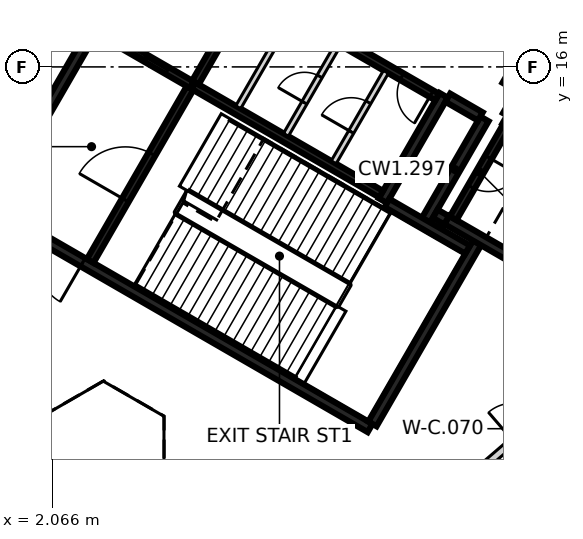
"""IFC4 building model, lengths in metres.
Left out: names, types, materials, properties, quantities, classifications, styles, units other than length and angle.
Written with IfcOpenShell. Run it as: python <this file> out.ifc"""

import sys

from ifc_helpers import new_model, si_unit, direction, frame, frame_2d, origin, place, context, subcontext, project, spatial, rectangle, extrude, element, fill, save


model = new_model("IFC4")
c1 = context("Model", 3, precision=1e-05, world=origin(), true_north=direction((0.0, 1.0)))
c2 = subcontext(c1, "Body", "Model", "MODEL_VIEW")
j1 = project(units=[si_unit("LENGTHUNIT", "METRE"), si_unit("PLANEANGLEUNIT", "RADIAN")], contexts=[c1])
p1 = place(None, origin())
s1 = spatial("IfcSite", under=j1, at=p1, CompositionType="ELEMENT")
p2 = place(p1, origin())
s2 = spatial("IfcBuilding", under=s1, at=p2, CompositionType="ELEMENT")
p3 = place(p2, frame((0.0, 0.0, 14.0)))
s3 = spatial("IfcBuildingStorey", under=s2, at=p3, CompositionType="ELEMENT", Elevation=14.0)
p4 = place(p3, frame((10.42, 6.498, 0.0), z_axis=(0.0, 0.0, 1.0), x_axis=(-0.866021906294, 0.500006057782, 0.0)))
e1 = element("IfcWall", 1, at=p4, inside=s3, PredefinedType="SHEAR", context=c2, shape_type="SweptSolid", body=[
    extrude(rectangle(XDim=11.55, YDim=0.25, at=frame_2d((5.775, 0.0))), origin(), (0.0, 0.0, 1.0), 5.15),
])
p5 = place(p4, frame((10.025, 0.0, 0.0)))
e2 = element("IfcOpeningElement", 2, at=p5, cuts=e1, PredefinedType="OPENING", context=c2, shape_type="SweptSolid", body=[
    extrude(rectangle(XDim=1.2, YDim=2.1, at=frame_2d((0.6, 1.05))), frame((0.0, 0.135, 0.0), z_axis=(0.0, -1.0, 0.0), x_axis=(1.0, 0.0, 0.0)), (0.0, 0.0, 1.0), 0.27),
])
p6 = place(p4, frame((8.725, 0.0, 0.0)))
e3 = element("IfcOpeningElement", 3, at=p6, cuts=e1, PredefinedType="OPENING", context=c2, shape_type="SweptSolid", body=[
    extrude(rectangle(XDim=1.2, YDim=2.1, at=frame_2d((0.6, 1.05))), frame((0.0, 0.135, 0.0), z_axis=(0.0, -1.0, 0.0), x_axis=(1.0, 0.0, 0.0)), (0.0, 0.0, 1.0), 0.27),
])
p7 = place(p3, frame((0.48, 12.381, 0.0), z_axis=(0.0, 0.0, 1.0), x_axis=(0.49999885962, 0.866026062182, 0.0)))
e4 = element("IfcWall", 4, at=p7, inside=s3, PredefinedType="SHEAR", context=c2, shape_type="SweptSolid", body=[
    extrude(rectangle(XDim=5.225, YDim=0.25, at=frame_2d((2.612, 0.0))), origin(), (0.0, 0.0, 1.0), 5.15),
])
p8 = place(p3, frame((13.238, 11.378, 0.0), z_axis=(0.0, 0.0, 1.0), x_axis=(-0.500008851346, -0.866020293397, 0.0)))
e5 = element("IfcWall", 5, at=p8, inside=s3, PredefinedType="SHEAR", context=c2, shape_type="SweptSolid", body=[
    extrude(rectangle(XDim=5.51, YDim=0.25, at=frame_2d((2.755, 0.0))), origin(), (0.0, 0.0, 1.0), 5.15),
])
p9 = place(p3, frame((12.357, 15.252, 0.0), z_axis=(0.0, 0.0, 1.0), x_axis=(-0.500028443584, -0.866008981251, 0.0)))
e6 = element("IfcWall", 6, at=p9, inside=s3, PredefinedType="SHEAR", context=c2, shape_type="SweptSolid", body=[
    extrude(rectangle(XDim=3.2, YDim=0.25, at=frame_2d((1.6, 0.0))), origin(), (0.0, 0.0, 1.0), 5.15),
])
p10 = place(p3, frame((14.918, 10.54, 0.0), z_axis=(0.0, 0.0, 1.0), x_axis=(-0.866063538972, 0.499933942099, 0.0)))
e7 = element("IfcWall", 7, at=p10, inside=s3, PredefinedType="SHEAR", context=c2, shape_type="SweptSolid", body=[
    extrude(rectangle(XDim=2.865, YDim=0.25, at=frame_2d((1.432, 0.0))), origin(), (0.0, 0.0, 1.0), 5.15),
])
p11 = place(p3, frame((13.963, 14.614, 0.0), z_axis=(0.0, 0.0, 1.0), x_axis=(0.866042235819, -0.499970844928, 0.0)))
e8 = element("IfcWall", 8, at=p11, inside=s3, PredefinedType="SHEAR", context=c2, shape_type="SweptSolid", body=[
    extrude(rectangle(XDim=2.865, YDim=0.25, at=frame_2d((1.432, 0.0))), origin(), (0.0, 0.0, 1.0), 5.15),
])
p12 = place(p3, frame((11.888, 11.961, 0.0), z_axis=(0.0, 0.0, 1.0), x_axis=(0.500003324108, 0.866023484601, 0.0)))
e9 = element("IfcWall", 9, at=p12, inside=s3, PredefinedType="SHEAR", context=c2, shape_type="SweptSolid", body=[
    extrude(rectangle(XDim=3.085, YDim=0.25, at=frame_2d((1.542, 0.0))), origin(), (0.0, 0.0, 1.0), 5.15),
])
p13 = place(p3, frame((10.865, 12.418, 0.0), z_axis=(0.0, 0.0, 1.0), x_axis=(0.866026229868, -0.499998569178, 0.0)))
e10 = element("IfcWall", 10, at=p13, inside=s3, PredefinedType="SHEAR", context=c2, shape_type="SweptSolid", body=[
    extrude(rectangle(XDim=2.449, YDim=0.25, at=frame_2d((1.225, 0.0))), origin(), (0.0, 0.0, 1.0), 5.15),
])
p14 = place(p3, frame((14.945, 17.135, 0.0), z_axis=(0.0, 0.0, 1.0), x_axis=(-0.499983108224, -0.866035156036, 0.0)))
e11 = element("IfcWall", 11, at=p14, inside=s3, PredefinedType="SHEAR", context=c2, shape_type="SweptSolid", body=[
    extrude(rectangle(XDim=1.865, YDim=0.25, at=frame_2d((0.932, 0.0))), origin(), (0.0, 0.0, 1.0), 5.15),
])
p15 = place(p14, frame((0.535, 0.0, 0.0)))
e12 = element("IfcOpeningElement", 12, at=p15, cuts=e11, PredefinedType="OPENING", context=c2, shape_type="SweptSolid", body=[
    extrude(rectangle(XDim=1.25, YDim=2.1, at=frame_2d((0.625, 1.05))), frame((0.0, 0.135, 0.0), z_axis=(0.0, -1.0, 0.0), x_axis=(1.0, 0.0, 0.0)), (0.0, 0.0, 1.0), 0.27),
])
p16 = place(p3, frame((13.322, 14.695, 0.0), z_axis=(0.0, 0.0, 1.0), x_axis=(-0.866017078145, 0.500014420154, 0.0)))
e13 = element("IfcWall", 13, at=p16, inside=s3, PredefinedType="SHEAR", context=c2, shape_type="SweptSolid", body=[
    extrude(rectangle(XDim=0.989, YDim=0.25, at=frame_2d((0.495, 0.0))), origin(), (0.0, 0.0, 1.0), 5.15),
])
p17 = place(p3, frame((14.368, 15.315, 0.0), z_axis=(0.0, 0.0, 1.0), x_axis=(-0.499897359611, -0.866084655132, 0.0)))
e14 = element("IfcWall", 14, at=p17, inside=s3, PredefinedType="SHEAR", context=c2, shape_type="SweptSolid", body=[
    extrude(rectangle(XDim=0.685, YDim=0.25, at=frame_2d((0.342, 0.0))), origin(), (0.0, 0.0, 1.0), 5.15),
])
p18 = place(p3, frame((12.433, 11.964, 0.0), z_axis=(0.0, 0.0, 1.0), x_axis=(-0.866055875208, 0.499947218231, 0.0)))
e15 = element("IfcWall", 15, at=p18, inside=s3, PredefinedType="SHEAR", context=c2, shape_type="SweptSolid", body=[
    extrude(rectangle(XDim=0.345, YDim=0.25, at=frame_2d((0.172, 0.0))), origin(), (0.0, 0.0, 1.0), 5.15),
])
p19 = place(p3, frame((5.775, 15.502, 0.0), z_axis=(0.0, 0.0, 1.0), x_axis=(0.866020080793, -0.500009219579, 0.0)))
e16 = element("IfcWall", 16, at=p19, inside=s3, PredefinedType="SHEAR", context=c2, shape_type="SweptSolid", body=[
    extrude(rectangle(XDim=5.699, YDim=0.2, at=frame_2d((2.85, 0.0))), origin(), (0.0, 0.0, 1.0), 5.15),
])
p20 = place(p3, frame((12.185, 15.207, 0.0), z_axis=(0.0, 0.0, 1.0), x_axis=(-0.866020080793, 0.500009219579, 0.0)))
e17 = element("IfcWall", 17, at=p20, inside=s3, PredefinedType="SHEAR", context=c2, shape_type="SweptSolid", body=[
    extrude(rectangle(XDim=5.699, YDim=0.2, at=frame_2d((2.85, 0.0))), origin(), (0.0, 0.0, 1.0), 5.15),
])
p21 = place(p20, frame((0.174, 0.0, 0.0)))
e18 = element("IfcOpeningElement", 18, at=p21, cuts=e17, PredefinedType="OPENING", context=c2, shape_type="SweptSolid", body=[
    extrude(rectangle(XDim=0.9, YDim=2.1, at=frame_2d((0.45, 1.05))), frame((0.0, 0.11, 0.0), z_axis=(0.0, -1.0, 0.0), x_axis=(1.0, 0.0, 0.0)), (0.0, 0.0, 1.0), 0.22),
])
p22 = place(p20, frame((4.599, 0.0, 0.0)))
e19 = element("IfcOpeningElement", 19, at=p22, cuts=e17, PredefinedType="OPENING", context=c2, shape_type="SweptSolid", body=[
    extrude(rectangle(XDim=0.9, YDim=2.1, at=frame_2d((0.45, 1.05))), frame((0.0, 0.11, 0.0), z_axis=(0.0, -1.0, 0.0), x_axis=(1.0, 0.0, 0.0)), (0.0, 0.0, 1.0), 0.22),
])
p23 = place(p3, frame((3.057, 10.895, 0.0), z_axis=(0.0, 0.0, 1.0), x_axis=(0.499989418164, 0.866031513124, 0.0)))
e20 = element("IfcWall", 20, at=p23, inside=s3, PredefinedType="SHEAR", context=c2, shape_type="SweptSolid", body=[
    extrude(rectangle(XDim=5.251, YDim=0.2, at=frame_2d((2.625, 0.0))), origin(), (0.0, 0.0, 1.0), 5.15),
])
p24 = place(p23, frame((1.849, 0.0, 0.0)))
e21 = element("IfcOpeningElement", 21, at=p24, cuts=e20, PredefinedType="OPENING", context=c2, shape_type="SweptSolid", body=[
    extrude(rectangle(XDim=1.4, YDim=2.1, at=frame_2d((0.7, 1.05))), frame((0.0, 0.11, 0.0), z_axis=(0.0, -1.0, 0.0), x_axis=(1.0, 0.0, 0.0)), (0.0, 0.0, 1.0), 0.22),
])
p25 = place(p3, frame((14.008, 14.442, 0.0), z_axis=(0.0, 0.0, 1.0), x_axis=(-0.499986818241, -0.866033014143, 0.0)))
e22 = element("IfcWall", 22, at=p25, inside=s3, PredefinedType="SHEAR", context=c2, shape_type="SweptSolid", body=[
    extrude(rectangle(XDim=2.798, YDim=0.2, at=frame_2d((1.399, 0.0))), origin(), (0.0, 0.0, 1.0), 5.15),
])
p26 = place(p25, frame((0.949, 0.0, 0.0)))
e23 = element("IfcOpeningElement", 23, at=p26, cuts=e22, PredefinedType="OPENING", context=c2, shape_type="SweptSolid", body=[
    extrude(rectangle(XDim=0.9, YDim=2.1, at=frame_2d((0.45, 1.05))), frame((0.0, 0.11, 0.0), z_axis=(0.0, -1.0, 0.0), x_axis=(1.0, 0.0, 0.0)), (0.0, 0.0, 1.0), 0.22),
])
p27 = place(p3, frame((7.199, 17.97, 0.0), z_axis=(0.0, 0.0, 1.0), x_axis=(-0.499968400327, -0.866043647095, 0.0)))
e24 = element("IfcWall", 24, at=p27, inside=s3, PredefinedType="SHEAR", context=c2, shape_type="SweptSolid", body=[
    extrude(rectangle(XDim=2.75, YDim=0.2, at=frame_2d((1.375, 0.0))), origin(), (0.0, 0.0, 1.0), 5.15),
])
p28 = place(p3, frame((5.725, 15.531, 0.0), z_axis=(0.0, 0.0, 1.0), x_axis=(-0.866037306777, 0.499979382845, 0.0)))
e25 = element("IfcWall", 25, at=p28, inside=s3, PredefinedType="SHEAR", context=c2, shape_type="SweptSolid", body=[
    extrude(rectangle(XDim=2.742, YDim=0.2, at=frame_2d((1.371, 0.0))), origin(), (0.0, 0.0, 1.0), 5.15),
])
p29 = place(p28, frame((0.743, 0.0, 0.0)))
e26 = element("IfcOpeningElement", 26, at=p29, cuts=e25, PredefinedType="OPENING", context=c2, shape_type="SweptSolid", body=[
    extrude(rectangle(XDim=1.3, YDim=2.1, at=frame_2d((0.65, 1.05))), frame((0.0, 0.11, 0.0), z_axis=(0.0, -1.0, 0.0), x_axis=(1.0, 0.0, 0.0)), (0.0, 0.0, 1.0), 0.22),
])
p30 = place(p3, frame((9.462, 13.489, 0.0), z_axis=(0.0, 0.0, 1.0), x_axis=(0.50002746344, 0.86600954718, 0.0)))
e27 = element("IfcWall", 27, at=p30, inside=s3, PredefinedType="PARTITIONING", context=c2, shape_type="SweptSolid", body=[
    extrude(rectangle(XDim=2.748, YDim=0.15, at=frame_2d((1.374, 0.0))), origin(), (0.0, 0.0, 1.0), 5.15),
])
p31 = place(p30, frame((0.924, 0.0, 0.0)))
e28 = element("IfcOpeningElement", 28, at=p31, cuts=e27, PredefinedType="OPENING", context=c2, shape_type="SweptSolid", body=[
    extrude(rectangle(XDim=0.9, YDim=2.1, at=frame_2d((0.45, 1.05))), frame((0.0, 0.085, 0.0), z_axis=(0.0, -1.0, 0.0), x_axis=(1.0, 0.0, 0.0)), (0.0, 0.0, 1.0), 0.17),
])
p32 = place(p3, frame((8.207, 14.214, 0.0), z_axis=(0.0, 0.0, 1.0), x_axis=(0.499922376475, 0.866070215109, 0.0)))
e29 = element("IfcWall", 29, at=p32, inside=s3, PredefinedType="PARTITIONING", context=c2, shape_type="SweptSolid", body=[
    extrude(rectangle(XDim=2.749, YDim=0.15, at=frame_2d((1.374, 0.0))), origin(), (0.0, 0.0, 1.0), 5.15),
])
p33 = place(p32, frame((0.974, 0.0, 0.0)))
e30 = element("IfcOpeningElement", 30, at=p33, cuts=e29, PredefinedType="OPENING", context=c2, shape_type="SweptSolid", body=[
    extrude(rectangle(XDim=0.8, YDim=2.1, at=frame_2d((0.4, 1.05))), frame((0.0, 0.085, 0.0), z_axis=(0.0, -1.0, 0.0), x_axis=(1.0, 0.0, 0.0)), (0.0, 0.0, 1.0), 0.17),
])
p34 = place(p3, frame((6.951, 14.939, 0.0), z_axis=(0.0, 0.0, 1.0), x_axis=(0.50002746344, 0.86600954718, 0.0)))
e31 = element("IfcWall", 31, at=p34, inside=s3, PredefinedType="PARTITIONING", context=c2, shape_type="SweptSolid", body=[
    extrude(rectangle(XDim=2.748, YDim=0.15, at=frame_2d((1.374, 0.0))), origin(), (0.0, 0.0, 1.0), 5.15),
])
p35 = place(p3, frame((12.187, 4.433, 0.0), z_axis=(0.0, 0.0, 1.0), x_axis=(0.757945584444, 0.652317783769, 0.0)))
e32 = element("IfcWall", 32, at=p35, inside=s3, PredefinedType="PARTITIONING", context=c2, shape_type="SweptSolid", body=[
    extrude(rectangle(XDim=6.278, YDim=0.2, at=frame_2d((3.139, 0.0))), origin(), (0.0, 0.0, 1.0), 5.15),
])
p36 = place(p35, frame((2.639, 0.0, 0.0)))
e33 = element("IfcOpeningElement", 33, at=p36, cuts=e32, PredefinedType="OPENING", context=c2, shape_type="SweptSolid", body=[
    extrude(rectangle(XDim=1.0, YDim=2.1, at=frame_2d((0.5, 1.05))), frame((0.0, 0.11, 0.0), z_axis=(0.0, -1.0, 0.0), x_axis=(1.0, 0.0, 0.0)), (0.0, 0.0, 1.0), 0.22),
])
p37 = place(p29, origin())
e34 = element("IfcDoor", 34, at=p37, inside=s3, OperationType="SLIDING_TO_LEFT", PredefinedType="DOOR", context=c2, shape_type="SweptSolid", body=[
    extrude(rectangle(XDim=1.3, YDim=2.1, at=frame_2d((0.65, 1.05))), frame((0.0, 0.025, 0.0), z_axis=(0.0, -1.0, 0.0), x_axis=(1.0, 0.0, 0.0)), (0.0, 0.0, 1.0), 0.05),
])
fill(e26, e34)
p38 = place(p6, origin())
e35 = element("IfcDoor", 35, at=p38, inside=s3, OperationType="SINGLE_SWING_RIGHT", PredefinedType="DOOR", context=c2, shape_type="SweptSolid", body=[
    extrude(rectangle(XDim=1.2, YDim=2.1, at=frame_2d((0.6, 1.05))), frame((0.0, 0.025, 0.0), z_axis=(0.0, -1.0, 0.0), x_axis=(1.0, 0.0, 0.0)), (0.0, 0.0, 1.0), 0.05),
])
fill(e3, e35)
p39 = place(p24, origin())
e36 = element("IfcDoor", 36, at=p39, inside=s3, OperationType="SINGLE_SWING_LEFT", PredefinedType="DOOR", context=c2, shape_type="SweptSolid", body=[
    extrude(rectangle(XDim=1.4, YDim=2.1, at=frame_2d((0.7, 1.05))), frame((0.0, 0.025, 0.0), z_axis=(0.0, -1.0, 0.0), x_axis=(1.0, 0.0, 0.0)), (0.0, 0.0, 1.0), 0.05),
])
fill(e21, e36)
p40 = place(p21, origin())
e37 = element("IfcDoor", 37, at=p40, inside=s3, OperationType="SINGLE_SWING_RIGHT", PredefinedType="DOOR", context=c2, shape_type="SweptSolid", body=[
    extrude(rectangle(XDim=0.9, YDim=2.1, at=frame_2d((0.45, 1.05))), frame((0.0, 0.025, 0.0), z_axis=(0.0, -1.0, 0.0), x_axis=(1.0, 0.0, 0.0)), (0.0, 0.0, 1.0), 0.05),
])
fill(e18, e37)
p41 = place(p31, origin())
e38 = element("IfcDoor", 38, at=p41, inside=s3, OperationType="SINGLE_SWING_LEFT", PredefinedType="DOOR", context=c2, shape_type="SweptSolid", body=[
    extrude(rectangle(XDim=0.9, YDim=2.1, at=frame_2d((0.45, 1.05))), frame((0.0, 0.025, 0.0), z_axis=(0.0, -1.0, 0.0), x_axis=(1.0, 0.0, 0.0)), (0.0, 0.0, 1.0), 0.05),
])
fill(e28, e38)
p42 = place(p33, origin())
e39 = element("IfcDoor", 39, at=p42, inside=s3, OperationType="SINGLE_SWING_RIGHT", PredefinedType="DOOR", context=c2, shape_type="SweptSolid", body=[
    extrude(rectangle(XDim=0.8, YDim=2.1, at=frame_2d((0.4, 1.05))), frame((0.0, 0.025, 0.0), z_axis=(0.0, -1.0, 0.0), x_axis=(1.0, 0.0, 0.0)), (0.0, 0.0, 1.0), 0.05),
])
fill(e30, e39)
p43 = place(p26, origin())
e40 = element("IfcDoor", 40, at=p43, inside=s3, OperationType="SINGLE_SWING_RIGHT", PredefinedType="DOOR", context=c2, shape_type="SweptSolid", body=[
    extrude(rectangle(XDim=0.9, YDim=2.1, at=frame_2d((0.45, 1.05))), frame((0.0, 0.025, 0.0), z_axis=(0.0, -1.0, 0.0), x_axis=(1.0, 0.0, 0.0)), (0.0, 0.0, 1.0), 0.05),
])
fill(e23, e40)
save(model, sys.argv[1])
